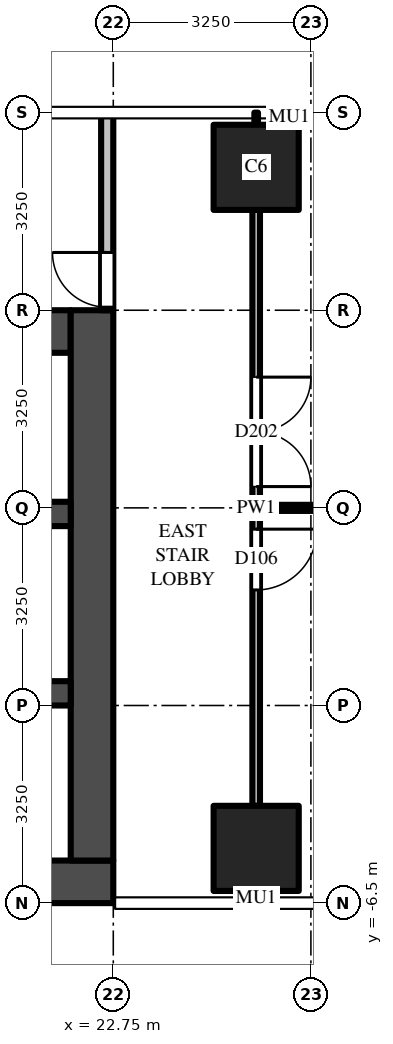
"""IFC4 building model, lengths in metres.
Left out: names, types, materials, properties, quantities, classifications, styles, units other than length and angle.
Written with IfcOpenShell. Run it as: python <this file> out.ifc"""

import sys

from ifc_helpers import new_model, si_unit, direction, frame, frame_2d, origin, origin_2d, place, context, subcontext, project, spatial, rectangle, extrude, source, transform, mapped, element, fill, save


model = new_model("IFC4")
c1 = context("Model", 3, precision=1e-05, world=origin(), true_north=direction((0.0, 1.0)))
c2 = subcontext(c1, "Body", "Model", "MODEL_VIEW")
j1 = project(units=[si_unit("LENGTHUNIT", "METRE"), si_unit("PLANEANGLEUNIT", "RADIAN")], contexts=[c1])
p1 = place(None, origin())
s1 = spatial("IfcSite", under=j1, at=p1, CompositionType="ELEMENT")
p2 = place(p1, origin())
s2 = spatial("IfcBuilding", under=s1, at=p2, CompositionType="ELEMENT")
p3 = place(p2, frame((0.0, 0.0, 88.0)))
s3 = spatial("IfcBuildingStorey", under=s2, at=p3, CompositionType="ELEMENT", Elevation=88.0)
m1 = source(origin(), c2, "Body", "SweptSolid", [
    extrude(rectangle(XDim=1.4, YDim=1.4, at=origin_2d()), origin(), (0.0, 0.0, 1.0), 4.5),
])
for number, where, z_axis, x_axis in (
    (1, (25.1, 5.6, 0.0), (0.0, 0.0, 1.0), (1.0, 0.0, 0.0)),
    (2, (25.1, -5.6, 0.0), (0.0, 0.0, 1.0), (1.0, 0.0, 0.0)),
):
    element("IfcColumn", number, at=place(p3, frame(where, z_axis=z_axis, x_axis=x_axis)), inside=s3, PredefinedType="COLUMN", context=c2, shape_type="MappedRepresentation", body=[
        mapped(m1, transform((0.0, 0.0, 0.0))),
    ])
m2 = source(origin(), c2, "Body", "SweptSolid", [
    extrude(rectangle(XDim=16.45, YDim=0.7, at=frame_2d((8.225, 0.0))), origin(), (0.0, 0.0, 1.0), 4.2),
])
p4 = place(p3, frame((6.3, -6.15, 0.0), z_axis=(0.0, 0.0, 1.0), x_axis=(1.0, 0.0, 0.0)))
e3 = element("IfcWall", 3, at=p4, inside=s3, PredefinedType="SHEAR", context=c2, shape_type="MappedRepresentation", body=[
    mapped(m2, transform((0.0, 0.0, 0.0))),
])
m3 = source(origin(), c2, "Body", "SweptSolid", [
    extrude(rectangle(XDim=14.85, YDim=0.7, at=frame_2d((7.425, 0.0))), origin(), (0.0, 0.0, 1.0), 4.2),
])
p5 = place(p3, frame((7.2, 2.9, 0.0), z_axis=(0.0, 0.0, 1.0), x_axis=(1.0, 0.0, 0.0)))
e4 = element("IfcWall", 4, at=p5, inside=s3, PredefinedType="SHEAR", context=c2, shape_type="MappedRepresentation", body=[
    mapped(m3, transform((0.0, 0.0, 0.0))),
])
m4 = source(origin(), c2, "Body", "SweptSolid", [
    extrude(rectangle(XDim=1.3, YDim=2.1, at=frame_2d((0.65, 1.05))), frame((0.0, 0.36, 0.0), z_axis=(0.0, -1.0, 0.0), x_axis=(1.0, 0.0, 0.0)), (0.0, 0.0, 1.0), 0.72),
])
p6 = place(p5, frame((12.2, 0.0, 0.0)))
e5 = element("IfcOpeningElement", 5, at=p6, cuts=e4, PredefinedType="OPENING", context=c2, shape_type="MappedRepresentation", body=[
    mapped(m4, transform((0.0, 0.0, 0.0))),
])
m5 = source(origin(), c2, "Body", "SweptSolid", [
    extrude(rectangle(XDim=1.2, YDim=2.1, at=frame_2d((0.6, 1.05))), frame((0.0, 0.36, 0.0), z_axis=(0.0, -1.0, 0.0), x_axis=(1.0, 0.0, 0.0)), (0.0, 0.0, 1.0), 0.72),
])
p7 = place(p5, frame((9.85, 0.0, 0.0)))
e6 = element("IfcOpeningElement", 6, at=p7, cuts=e4, PredefinedType="OPENING", context=c2, shape_type="MappedRepresentation", body=[
    mapped(m5, transform((0.0, 0.0, 0.0))),
])
m6 = source(origin(), c2, "Body", "SweptSolid", [
    extrude(rectangle(XDim=1.0, YDim=2.1, at=frame_2d((0.5, 1.05))), frame((0.0, 0.36, 0.0), z_axis=(0.0, -1.0, 0.0), x_axis=(1.0, 0.0, 0.0)), (0.0, 0.0, 1.0), 0.72),
])
p8 = place(p5, frame((7.9, 0.0, 0.0)))
e7 = element("IfcOpeningElement", 7, at=p8, cuts=e4, PredefinedType="OPENING", context=c2, shape_type="MappedRepresentation", body=[
    mapped(m6, transform((0.0, 0.0, 0.0))),
])
p9 = place(p5, frame((0.6, 0.0, 0.0)))
e8 = element("IfcOpeningElement", 8, at=p9, cuts=e4, PredefinedType="OPENING", context=c2, shape_type="MappedRepresentation", body=[
    mapped(m6, transform((0.0, 0.0, 0.0))),
])
m7 = source(origin(), c2, "Body", "SweptSolid", [
    extrude(rectangle(XDim=0.9, YDim=2.1, at=frame_2d((0.45, 1.05))), frame((0.0, 0.36, 0.0), z_axis=(0.0, -1.0, 0.0), x_axis=(1.0, 0.0, 0.0)), (0.0, 0.0, 1.0), 0.72),
])
p10 = place(p5, frame((3.25, 0.0, 0.0)))
e9 = element("IfcOpeningElement", 9, at=p10, cuts=e4, PredefinedType="OPENING", context=c2, shape_type="MappedRepresentation", body=[
    mapped(m7, transform((0.0, 0.0, 0.0))),
])
p11 = place(p5, frame((5.85, 0.0, 0.0)))
e10 = element("IfcOpeningElement", 10, at=p11, cuts=e4, PredefinedType="OPENING", context=c2, shape_type="MappedRepresentation", body=[
    mapped(m7, transform((0.0, 0.0, 0.0))),
])
m8 = source(origin(), c2, "Body", "SweptSolid", [
    extrude(rectangle(XDim=9.05, YDim=0.7, at=frame_2d((4.525, 0.0))), origin(), (0.0, 0.0, 1.0), 4.2),
])
p12 = place(p3, frame((22.4, -5.8, 0.0), z_axis=(0.0, 0.0, 1.0), x_axis=(0.0, 1.0, 0.0)))
e11 = element("IfcWall", 11, at=p12, inside=s3, PredefinedType="SHEAR", context=c2, shape_type="MappedRepresentation", body=[
    mapped(m8, transform((0.0, 0.0, 0.0))),
])
m9 = source(origin(), c2, "Body", "SweptSolid", [
    extrude(rectangle(XDim=14.85, YDim=0.4, at=frame_2d((7.425, 0.0))), origin(), (0.0, 0.0, 1.0), 4.2),
])
p13 = place(p3, frame((7.2, -0.1, 0.0), z_axis=(0.0, 0.0, 1.0), x_axis=(1.0, 0.0, 0.0)))
e12 = element("IfcWall", 12, at=p13, inside=s3, PredefinedType="SHEAR", context=c2, shape_type="MappedRepresentation", body=[
    mapped(m9, transform((0.0, 0.0, 0.0))),
])
m10 = source(origin(), c2, "Body", "SweptSolid", [
    extrude(rectangle(XDim=1.0, YDim=2.1, at=frame_2d((0.5, 1.05))), frame((0.0, 0.21, 0.0), z_axis=(0.0, -1.0, 0.0), x_axis=(1.0, 0.0, 0.0)), (0.0, 0.0, 1.0), 0.42),
])
p14 = place(p13, frame((7.9, 0.0, 0.0)))
e13 = element("IfcOpeningElement", 13, at=p14, cuts=e12, PredefinedType="OPENING", context=c2, shape_type="MappedRepresentation", body=[
    mapped(m10, transform((0.0, 0.0, 0.0))),
])
m11 = source(origin(), c2, "Body", "SweptSolid", [
    extrude(rectangle(XDim=5.7, YDim=0.4, at=frame_2d((2.85, 0.0))), origin(), (0.0, 0.0, 1.0), 4.2),
])
p15 = place(p3, frame((16.35, -3.05, 0.0), z_axis=(0.0, 0.0, 1.0), x_axis=(1.0, 0.0, 0.0)))
e14 = element("IfcWall", 14, at=p15, inside=s3, PredefinedType="SHEAR", context=c2, shape_type="MappedRepresentation", body=[
    mapped(m11, transform((0.0, 0.0, 0.0))),
])
m12 = source(origin(), c2, "Body", "SweptSolid", [
    extrude(rectangle(XDim=3.25, YDim=0.2, at=frame_2d((1.625, 0.0))), origin(), (0.0, 0.0, 1.0), 4.2),
])
p16 = place(p3, frame((22.65, 3.25, 0.0), z_axis=(0.0, 0.0, 1.0), x_axis=(0.0, 1.0, 0.0)))
e15 = element("IfcWall", 15, at=p16, inside=s3, PredefinedType="PARTITIONING", context=c2, shape_type="MappedRepresentation", body=[
    mapped(m12, transform((0.0, 0.0, 0.0))),
])
m13 = source(origin(), c2, "Body", "SweptSolid", [
    extrude(rectangle(XDim=0.9, YDim=2.1, at=frame_2d((0.45, 1.05))), frame((0.0, 0.11, 0.0), z_axis=(0.0, -1.0, 0.0), x_axis=(1.0, 0.0, 0.0)), (0.0, 0.0, 1.0), 0.22),
])
p17 = place(p16, frame((0.05, 0.0, 0.0)))
e16 = element("IfcOpeningElement", 16, at=p17, cuts=e15, PredefinedType="OPENING", context=c2, shape_type="MappedRepresentation", body=[
    mapped(m13, transform((0.0, 0.0, 0.0))),
])
p18 = place(p3, frame((28.675, 6.4, 0.0), z_axis=(0.0, 0.0, 1.0), x_axis=(-1.0, 0.0, 0.0)))
e17 = element("IfcWall", 17, at=p18, inside=s3, PredefinedType="SOLIDWALL", context=c2, shape_type="SweptSolid", body=[
    extrude(rectangle(XDim=3.0, YDim=0.2, at=frame_2d((1.5, 0.0))), origin(), (0.0, 0.0, 1.0), 4.2),
])
m14 = source(origin(), c2, "Body", "SweptSolid", [
    extrude(rectangle(XDim=1.8, YDim=2.4, at=frame_2d((0.9, 1.2))), frame((0.0, 0.11, 0.0), z_axis=(0.0, -1.0, 0.0), x_axis=(1.0, 0.0, 0.0)), (0.0, 0.0, 1.0), 0.22),
])
p19 = place(p18, frame((0.6, 0.0, 0.0)))
e18 = element("IfcOpeningElement", 18, at=p19, cuts=e17, PredefinedType="OPENING", context=c2, shape_type="MappedRepresentation", body=[
    mapped(m14, transform((0.0, 0.0, 0.0))),
])
m15 = source(origin(), c2, "Body", "SweptSolid", [
    extrude(rectangle(XDim=9.8, YDim=0.125, at=frame_2d((4.9, 0.0))), origin(), (0.0, 0.0, 1.0), 3.418),
])
p20 = place(p3, frame((25.1, 4.9, 0.0), z_axis=(0.0, 0.0, 1.0), x_axis=(0.0, -1.0, 0.0)))
e19 = element("IfcWall", 19, at=p20, inside=s3, PredefinedType="PARTITIONING", context=c2, shape_type="MappedRepresentation", body=[
    mapped(m15, transform((0.0, 0.0, 0.0))),
])
m16 = source(origin(), c2, "Body", "SweptSolid", [
    extrude(rectangle(XDim=1.0, YDim=2.1, at=frame_2d((0.5, 1.05))), frame((0.0, 0.073, 0.0), z_axis=(0.0, -1.0, 0.0), x_axis=(1.0, 0.0, 0.0)), (0.0, 0.0, 1.0), 0.145),
])
p21 = place(p20, frame((5.25, 0.0, 0.0)))
e20 = element("IfcOpeningElement", 20, at=p21, cuts=e19, PredefinedType="OPENING", context=c2, shape_type="MappedRepresentation", body=[
    mapped(m16, transform((0.0, 0.0, 0.0))),
])
m17 = source(origin(), c2, "Body", "SweptSolid", [
    extrude(rectangle(XDim=1.8, YDim=2.1, at=frame_2d((0.9, 1.05))), frame((0.0, 0.073, 0.0), z_axis=(0.0, -1.0, 0.0), x_axis=(1.0, 0.0, 0.0)), (0.0, 0.0, 1.0), 0.145),
])
p22 = place(p20, frame((2.75, 0.0, 0.0)))
e21 = element("IfcOpeningElement", 21, at=p22, cuts=e19, PredefinedType="OPENING", context=c2, shape_type="MappedRepresentation", body=[
    mapped(m17, transform((0.0, 0.0, 0.0))),
])
p23 = place(p3, frame((25.163, 0.0, 0.0), z_axis=(0.0, 0.0, 1.0), x_axis=(1.0, 0.0, 0.0)))
e22 = element("IfcWall", 22, at=p23, inside=s3, PredefinedType="PARTITIONING", context=c2, shape_type="SweptSolid", body=[
    extrude(rectangle(XDim=7.137, YDim=0.1, at=frame_2d((3.569, 0.0))), origin(), (0.0, 0.0, 1.0), 3.28),
])
m18 = source(origin(), c2, "Body", "SweptSolid", [
    extrude(rectangle(XDim=0.9, YDim=2.1, at=frame_2d((0.45, 1.05))), frame((0.0, 0.025, 0.0), z_axis=(0.0, -1.0, 0.0), x_axis=(1.0, 0.0, 0.0)), (0.0, 0.0, 1.0), 0.05),
])
p24 = place(p17, origin())
e23 = element("IfcDoor", 23, at=p24, inside=s3, OperationType="SINGLE_SWING_RIGHT", PredefinedType="DOOR", context=c2, shape_type="MappedRepresentation", body=[
    mapped(m18, transform((0.0, 0.0, 0.0))),
])
fill(e16, e23)
m19 = source(origin(), c2, "Body", "SweptSolid", [
    extrude(rectangle(XDim=1.0, YDim=2.1, at=frame_2d((0.5, 1.05))), frame((0.0, 0.025, 0.0), z_axis=(0.0, -1.0, 0.0), x_axis=(1.0, 0.0, 0.0)), (0.0, 0.0, 1.0), 0.05),
])
p25 = place(p21, origin())
e24 = element("IfcDoor", 24, at=p25, inside=s3, OperationType="SINGLE_SWING_LEFT", PredefinedType="DOOR", context=c2, shape_type="MappedRepresentation", body=[
    mapped(m19, transform((0.0, 0.0, 0.0))),
])
fill(e20, e24)
m20 = source(origin(), c2, "Body", "SweptSolid", [
    extrude(rectangle(XDim=1.8, YDim=2.1, at=frame_2d((0.9, 1.05))), frame((0.0, 0.025, 0.0), z_axis=(0.0, -1.0, 0.0), x_axis=(1.0, 0.0, 0.0)), (0.0, 0.0, 1.0), 0.05),
])
p26 = place(p22, origin())
e25 = element("IfcDoor", 25, at=p26, inside=s3, OperationType="DOUBLE_DOOR_SINGLE_SWING", PredefinedType="DOOR", context=c2, shape_type="MappedRepresentation", body=[
    mapped(m20, transform((0.0, 0.0, 0.0))),
])
fill(e21, e25)
save(model, sys.argv[1])
